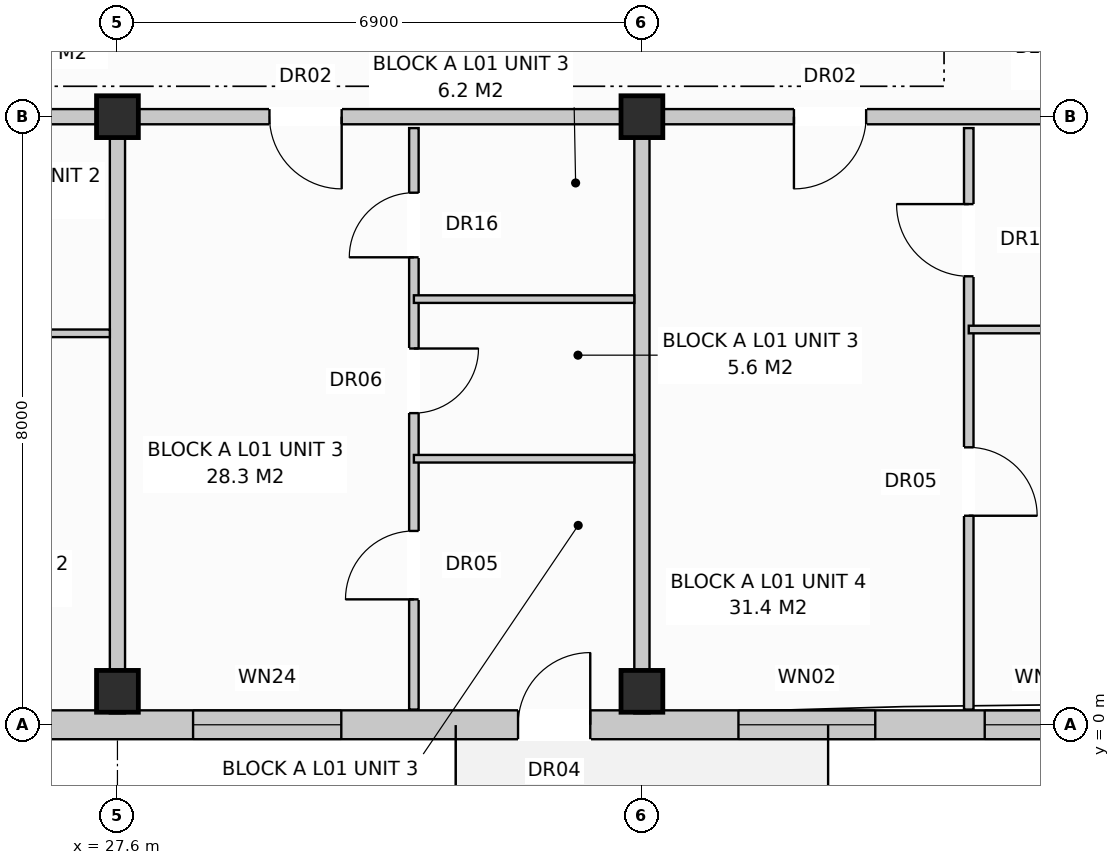
"""IFC4 building model, lengths in metres.
Left out: names, types, materials, properties, quantities, classifications, styles, units other than length and angle.
Written with IfcOpenShell. Run it as: python <this file> out.ifc"""

import sys

from ifc_helpers import new_model, si_unit, direction, frame, frame_2d, origin, origin_with_axes, origin_2d, place, context, subcontext, project, spatial, rectangle, extrude, element, fill, save


model = new_model("IFC4")
c1 = context("Model", 3, precision=1e-05, world=origin(), true_north=direction((0.0, 1.0)))
c2 = subcontext(c1, "Body", "Model", "MODEL_VIEW")
j1 = project(units=[si_unit("LENGTHUNIT", "METRE"), si_unit("PLANEANGLEUNIT", "RADIAN")], contexts=[c1])
p1 = place(None, origin())
s1 = spatial("IfcSite", under=j1, at=p1, CompositionType="ELEMENT")
p2 = place(p1, origin())
s2 = spatial("IfcBuilding", under=s1, at=p2, CompositionType="ELEMENT")
p3 = place(p2, frame((0.0, 0.0, 4.4)))
s3 = spatial("IfcBuildingStorey", under=s2, at=p3, CompositionType="ELEMENT", Elevation=4.4)
for number, where, z_axis, x_axis in (
    (1, (27.6, 0.44, 0.0), (0.0, 0.0, 1.0), (1.0, 0.0, 0.0)),
    (2, (27.6, 8.0, 0.0), (0.0, 0.0, 1.0), (1.0, 0.0, 0.0)),
    (3, (34.5, 0.44, 0.0), (0.0, 0.0, 1.0), (1.0, 0.0, 0.0)),
    (4, (34.5, 8.0, 0.0), (0.0, 0.0, 1.0), (1.0, 0.0, 0.0)),
):
    element("IfcColumn", number, at=place(p3, frame(where, z_axis=z_axis, x_axis=x_axis)), inside=s3, PredefinedType="COLUMN", context=c2, shape_type="SweptSolid", body=[
        extrude(rectangle(XDim=0.55, YDim=0.55, at=origin_2d()), origin(), (0.0, 0.0, 1.0), 3.6),
    ])
p4 = place(p3, frame((0.18, 0.0, 0.0), z_axis=(0.0, 0.0, 1.0), x_axis=(1.0, 0.0, 0.0)))
e5 = element("IfcWall", 5, at=p4, inside=s3, PredefinedType="STANDARD", context=c2, shape_type="SweptSolid", body=[
    extrude(rectangle(XDim=54.84, YDim=0.38, at=frame_2d((27.42, 0.0))), origin(), (0.0, 0.0, 1.0), 3.33),
])
p5 = place(p4, frame((5.09, 0.0, 0.0)))
e6 = element("IfcOpeningElement", 6, at=p5, cuts=e5, PredefinedType="OPENING", context=c2, shape_type="SweptSolid", body=[
    extrude(rectangle(XDim=0.95, YDim=2.1, at=frame_2d((0.475, 1.05))), frame((0.0, 0.202, 0.0), z_axis=(0.0, -1.0, 0.0), x_axis=(1.0, 0.0, 0.0)), (0.0, 0.0, 1.0), 0.404),
])
p6 = place(p4, frame((18.89, 0.0, 0.0)))
e7 = element("IfcOpeningElement", 7, at=p6, cuts=e5, PredefinedType="OPENING", context=c2, shape_type="SweptSolid", body=[
    extrude(rectangle(XDim=0.95, YDim=2.1, at=frame_2d((0.475, 1.05))), frame((0.0, 0.202, 0.0), z_axis=(0.0, -1.0, 0.0), x_axis=(1.0, 0.0, 0.0)), (0.0, 0.0, 1.0), 0.404),
])
p7 = place(p4, frame((32.69, 0.0, 0.0)))
e8 = element("IfcOpeningElement", 8, at=p7, cuts=e5, PredefinedType="OPENING", context=c2, shape_type="SweptSolid", body=[
    extrude(rectangle(XDim=0.95, YDim=2.1, at=frame_2d((0.475, 1.05))), frame((0.0, 0.202, 0.0), z_axis=(0.0, -1.0, 0.0), x_axis=(1.0, 0.0, 0.0)), (0.0, 0.0, 1.0), 0.404),
])
p8 = place(p4, frame((46.507, 0.0, 0.0)))
e9 = element("IfcOpeningElement", 9, at=p8, cuts=e5, PredefinedType="OPENING", context=c2, shape_type="SweptSolid", body=[
    extrude(rectangle(XDim=0.95, YDim=2.1, at=frame_2d((0.475, 1.05))), frame((0.0, 0.202, 0.0), z_axis=(0.0, -1.0, 0.0), x_axis=(1.0, 0.0, 0.0)), (0.0, 0.0, 1.0), 0.404),
])
p9 = place(p4, frame((0.89, 0.0, 0.8)))
e10 = element("IfcOpeningElement", 10, at=p9, cuts=e5, PredefinedType="OPENING", context=c2, shape_type="SweptSolid", body=[
    extrude(rectangle(XDim=1.8, YDim=1.7, at=frame_2d((0.9, 0.85))), frame((0.0, 0.202, 0.0), z_axis=(0.0, -1.0, 0.0), x_axis=(1.0, 0.0, 0.0)), (0.0, 0.0, 1.0), 0.404),
])
p10 = place(p4, frame((8.94, 0.0, 0.8)))
e11 = element("IfcOpeningElement", 11, at=p10, cuts=e5, PredefinedType="OPENING", context=c2, shape_type="SweptSolid", body=[
    extrude(rectangle(XDim=1.9, YDim=1.85, at=frame_2d((0.95, 0.925))), frame((0.0, 0.202, 0.0), z_axis=(0.0, -1.0, 0.0), x_axis=(1.0, 0.0, 0.0)), (0.0, 0.0, 1.0), 0.404),
])
p11 = place(p4, frame((14.615, 0.0, 0.8)))
e12 = element("IfcOpeningElement", 12, at=p11, cuts=e5, PredefinedType="OPENING", context=c2, shape_type="SweptSolid", body=[
    extrude(rectangle(XDim=1.95, YDim=1.65, at=frame_2d((0.975, 0.825))), frame((0.0, 0.202, 0.0), z_axis=(0.0, -1.0, 0.0), x_axis=(1.0, 0.0, 0.0)), (0.0, 0.0, 1.0), 0.404),
])
p12 = place(p4, frame((21.09, 0.0, 0.8)))
e13 = element("IfcOpeningElement", 13, at=p12, cuts=e5, PredefinedType="OPENING", context=c2, shape_type="SweptSolid", body=[
    extrude(rectangle(XDim=1.8, YDim=1.7, at=frame_2d((0.9, 0.85))), frame((0.0, 0.202, 0.0), z_axis=(0.0, -1.0, 0.0), x_axis=(1.0, 0.0, 0.0)), (0.0, 0.0, 1.0), 0.404),
])
p13 = place(p4, frame((24.44, 0.0, 0.8)))
e14 = element("IfcOpeningElement", 14, at=p13, cuts=e5, PredefinedType="OPENING", context=c2, shape_type="SweptSolid", body=[
    extrude(rectangle(XDim=1.9, YDim=1.85, at=frame_2d((0.95, 0.925))), frame((0.0, 0.202, 0.0), z_axis=(0.0, -1.0, 0.0), x_axis=(1.0, 0.0, 0.0)), (0.0, 0.0, 1.0), 0.404),
])
p14 = place(p4, frame((28.415, 0.0, 0.8)))
e15 = element("IfcOpeningElement", 15, at=p14, cuts=e5, PredefinedType="OPENING", context=c2, shape_type="SweptSolid", body=[
    extrude(rectangle(XDim=1.95, YDim=1.65, at=frame_2d((0.975, 0.825))), frame((0.0, 0.202, 0.0), z_axis=(0.0, -1.0, 0.0), x_axis=(1.0, 0.0, 0.0)), (0.0, 0.0, 1.0), 0.404),
])
p15 = place(p4, frame((35.59, 0.0, 0.8)))
e16 = element("IfcOpeningElement", 16, at=p15, cuts=e5, PredefinedType="OPENING", context=c2, shape_type="SweptSolid", body=[
    extrude(rectangle(XDim=1.8, YDim=1.7, at=frame_2d((0.9, 0.85))), frame((0.0, 0.202, 0.0), z_axis=(0.0, -1.0, 0.0), x_axis=(1.0, 0.0, 0.0)), (0.0, 0.0, 1.0), 0.404),
])
p16 = place(p4, frame((38.83, 0.0, 0.8)))
e17 = element("IfcOpeningElement", 17, at=p16, cuts=e5, PredefinedType="OPENING", context=c2, shape_type="SweptSolid", body=[
    extrude(rectangle(XDim=1.55, YDim=1.55, at=frame_2d((0.775, 0.775))), frame((0.0, 0.202, 0.0), z_axis=(0.0, -1.0, 0.0), x_axis=(1.0, 0.0, 0.0)), (0.0, 0.0, 1.0), 0.404),
])
p17 = place(p4, frame((42.415, 0.0, 0.8)))
e18 = element("IfcOpeningElement", 18, at=p17, cuts=e5, PredefinedType="OPENING", context=c2, shape_type="SweptSolid", body=[
    extrude(rectangle(XDim=1.95, YDim=1.65, at=frame_2d((0.975, 0.825))), frame((0.0, 0.202, 0.0), z_axis=(0.0, -1.0, 0.0), x_axis=(1.0, 0.0, 0.0)), (0.0, 0.0, 1.0), 0.404),
])
p18 = place(p4, frame((48.69, 0.0, 0.9)))
e19 = element("IfcOpeningElement", 19, at=p18, cuts=e5, PredefinedType="OPENING", context=c2, shape_type="SweptSolid", body=[
    extrude(rectangle(XDim=0.95, YDim=1.55, at=frame_2d((0.475, 0.775))), frame((0.0, 0.202, 0.0), z_axis=(0.0, -1.0, 0.0), x_axis=(1.0, 0.0, 0.0)), (0.0, 0.0, 1.0), 0.404),
])
p19 = place(p4, frame((51.44, 0.0, 0.8)))
e20 = element("IfcOpeningElement", 20, at=p19, cuts=e5, PredefinedType="OPENING", context=c2, shape_type="SweptSolid", body=[
    extrude(rectangle(XDim=1.9, YDim=1.85, at=frame_2d((0.95, 0.925))), frame((0.0, 0.202, 0.0), z_axis=(0.0, -1.0, 0.0), x_axis=(1.0, 0.0, 0.0)), (0.0, 0.0, 1.0), 0.404),
])
p20 = place(p3, frame((27.6, 7.85, 0.0), z_axis=(0.0, 0.0, 1.0), x_axis=(0.0, -1.0, 0.0)))
e21 = element("IfcWall", 21, at=p20, inside=s3, PredefinedType="PARTITIONING", context=c2, shape_type="SweptSolid", body=[
    extrude(rectangle(XDim=7.7, YDim=0.2, at=frame_2d((3.85, 0.0))), origin(), (0.0, 0.0, 1.0), 3.33),
])
p21 = place(p3, frame((6.9, 8.0, 0.0), z_axis=(0.0, 0.0, 1.0), x_axis=(1.0, 0.0, 0.0)))
e22 = element("IfcWall", 22, at=p21, inside=s3, PredefinedType="PARTITIONING", context=c2, shape_type="SweptSolid", body=[
    extrude(rectangle(XDim=20.7, YDim=0.2, at=frame_2d((10.35, 0.0))), origin(), (0.0, 0.0, 1.0), 2.77),
])
p22 = place(p21, frame((2.4, 0.0, 0.0)))
e23 = element("IfcOpeningElement", 23, at=p22, cuts=e22, PredefinedType="OPENING", context=c2, shape_type="SweptSolid", body=[
    extrude(rectangle(XDim=0.95, YDim=2.15, at=frame_2d((0.475, 1.075))), frame((0.0, 0.112, 0.0), z_axis=(0.0, -1.0, 0.0), x_axis=(1.0, 0.0, 0.0)), (0.0, 0.0, 1.0), 0.224),
])
p23 = place(p3, frame((13.2, 5.15, 0.0), z_axis=(0.0, 0.0, 1.0), x_axis=(1.0, 0.0, 0.0)))
e24 = element("IfcWall", 24, at=p23, inside=s3, PredefinedType="PARTITIONING", context=c2, shape_type="SweptSolid", body=[
    extrude(rectangle(XDim=14.3, YDim=0.1, at=frame_2d((7.15, 0.0))), origin(), (0.0, 0.0, 1.0), 3.33),
])
p24 = place(p23, frame((1.6, 0.0, 0.0)))
e25 = element("IfcOpeningElement", 25, at=p24, cuts=e24, PredefinedType="OPENING", context=c2, shape_type="SweptSolid", body=[
    extrude(rectangle(XDim=0.9, YDim=2.1, at=frame_2d((0.45, 1.05))), frame((0.0, 0.062, 0.0), z_axis=(0.0, -1.0, 0.0), x_axis=(1.0, 0.0, 0.0)), (0.0, 0.0, 1.0), 0.124),
])
p25 = place(p23, frame((5.1, 0.0, 0.0)))
e26 = element("IfcOpeningElement", 26, at=p25, cuts=e24, PredefinedType="OPENING", context=c2, shape_type="SweptSolid", body=[
    extrude(rectangle(XDim=0.85, YDim=2.05, at=frame_2d((0.425, 1.025))), frame((0.0, 0.062, 0.0), z_axis=(0.0, -1.0, 0.0), x_axis=(1.0, 0.0, 0.0)), (0.0, 0.0, 1.0), 0.124),
])
p26 = place(p23, frame((8.2, 0.0, 0.0)))
e27 = element("IfcOpeningElement", 27, at=p26, cuts=e24, PredefinedType="OPENING", context=c2, shape_type="SweptSolid", body=[
    extrude(rectangle(XDim=0.85, YDim=2.05, at=frame_2d((0.425, 1.025))), frame((0.0, 0.062, 0.0), z_axis=(0.0, -1.0, 0.0), x_axis=(1.0, 0.0, 0.0)), (0.0, 0.0, 1.0), 0.124),
])
p27 = place(p23, frame((11.6, 0.0, 0.0)))
e28 = element("IfcOpeningElement", 28, at=p27, cuts=e24, PredefinedType="OPENING", context=c2, shape_type="SweptSolid", body=[
    extrude(rectangle(XDim=0.85, YDim=2.05, at=frame_2d((0.425, 1.025))), frame((0.0, 0.062, 0.0), z_axis=(0.0, -1.0, 0.0), x_axis=(1.0, 0.0, 0.0)), (0.0, 0.0, 1.0), 0.124),
])
p28 = place(p3, frame((34.5, 7.85, 0.0), z_axis=(0.0, 0.0, 1.0), x_axis=(0.0, -1.0, 0.0)))
e29 = element("IfcWall", 29, at=p28, inside=s3, PredefinedType="PARTITIONING", context=c2, shape_type="SweptSolid", body=[
    extrude(rectangle(XDim=7.7, YDim=0.2, at=frame_2d((3.85, 0.0))), origin(), (0.0, 0.0, 1.0), 3.33),
])
p29 = place(p3, frame((27.6, 8.0, 0.0), z_axis=(0.0, 0.0, 1.0), x_axis=(1.0, 0.0, 0.0)))
e30 = element("IfcWall", 30, at=p29, inside=s3, PredefinedType="PARTITIONING", context=c2, shape_type="SweptSolid", body=[
    extrude(rectangle(XDim=6.9, YDim=0.2, at=frame_2d((3.45, 0.0))), origin(), (0.0, 0.0, 1.0), 2.77),
])
p30 = place(p29, frame((2.0, 0.0, 0.0)))
e31 = element("IfcOpeningElement", 31, at=p30, cuts=e30, PredefinedType="OPENING", context=c2, shape_type="SweptSolid", body=[
    extrude(rectangle(XDim=0.95, YDim=2.15, at=frame_2d((0.475, 1.075))), frame((0.0, 0.112, 0.0), z_axis=(0.0, -1.0, 0.0), x_axis=(1.0, 0.0, 0.0)), (0.0, 0.0, 1.0), 0.224),
])
p31 = place(p3, frame((31.5, 7.85, 0.0), z_axis=(0.0, 0.0, 1.0), x_axis=(0.0, -1.0, 0.0)))
e32 = element("IfcWall", 32, at=p31, inside=s3, PredefinedType="PARTITIONING", context=c2, shape_type="SweptSolid", body=[
    extrude(rectangle(XDim=7.65, YDim=0.125, at=frame_2d((3.825, 0.0))), origin(), (0.0, 0.0, 1.0), 3.33),
])
p32 = place(p31, frame((0.85, 0.0, 0.0)))
e33 = element("IfcOpeningElement", 33, at=p32, cuts=e32, PredefinedType="OPENING", context=c2, shape_type="SweptSolid", body=[
    extrude(rectangle(XDim=0.85, YDim=2.1, at=frame_2d((0.425, 1.05))), frame((0.0, 0.074, 0.0), z_axis=(0.0, -1.0, 0.0), x_axis=(1.0, 0.0, 0.0)), (0.0, 0.0, 1.0), 0.149),
])
p33 = place(p31, frame((2.9, 0.0, 0.0)))
e34 = element("IfcOpeningElement", 34, at=p33, cuts=e32, PredefinedType="OPENING", context=c2, shape_type="SweptSolid", body=[
    extrude(rectangle(XDim=0.85, YDim=2.05, at=frame_2d((0.425, 1.025))), frame((0.0, 0.074, 0.0), z_axis=(0.0, -1.0, 0.0), x_axis=(1.0, 0.0, 0.0)), (0.0, 0.0, 1.0), 0.149),
])
p34 = place(p31, frame((5.3, 0.0, 0.0)))
e35 = element("IfcOpeningElement", 35, at=p34, cuts=e32, PredefinedType="OPENING", context=c2, shape_type="SweptSolid", body=[
    extrude(rectangle(XDim=0.9, YDim=2.1, at=frame_2d((0.45, 1.05))), frame((0.0, 0.074, 0.0), z_axis=(0.0, -1.0, 0.0), x_axis=(1.0, 0.0, 0.0)), (0.0, 0.0, 1.0), 0.149),
])
for number, where, z_axis, x_axis in (
    (36, (31.5, 5.6, 0.0), (0.0, 0.0, 1.0), (1.0, 0.0, 0.0)),
    (37, (31.5, 3.5, 0.0), (0.0, 0.0, 1.0), (1.0, 0.0, 0.0)),
):
    element("IfcWall", number, at=place(p3, frame(where, z_axis=z_axis, x_axis=x_axis)), inside=s3, PredefinedType="PARTITIONING", context=c2, shape_type="SweptSolid", body=[
        extrude(rectangle(XDim=2.9, YDim=0.1, at=frame_2d((1.45, 0.0))), origin(), (0.0, 0.0, 1.0), 3.33),
    ])
p35 = place(p3, frame((34.5, 8.0, 0.0), z_axis=(0.0, 0.0, 1.0), x_axis=(1.0, 0.0, 0.0)))
e38 = element("IfcWall", 38, at=p35, inside=s3, PredefinedType="PARTITIONING", context=c2, shape_type="SweptSolid", body=[
    extrude(rectangle(XDim=6.9, YDim=0.2, at=frame_2d((3.45, 0.0))), origin(), (0.0, 0.0, 1.0), 2.77),
])
p36 = place(p35, frame((2.0, 0.0, 0.0)))
e39 = element("IfcOpeningElement", 39, at=p36, cuts=e38, PredefinedType="OPENING", context=c2, shape_type="SweptSolid", body=[
    extrude(rectangle(XDim=0.95, YDim=2.15, at=frame_2d((0.475, 1.075))), frame((0.0, 0.112, 0.0), z_axis=(0.0, -1.0, 0.0), x_axis=(1.0, 0.0, 0.0)), (0.0, 0.0, 1.0), 0.224),
])
p37 = place(p3, frame((38.8, 7.85, 0.0), z_axis=(0.0, 0.0, 1.0), x_axis=(0.0, -1.0, 0.0)))
e40 = element("IfcWall", 40, at=p37, inside=s3, PredefinedType="PARTITIONING", context=c2, shape_type="SweptSolid", body=[
    extrude(rectangle(XDim=7.65, YDim=0.125, at=frame_2d((3.825, 0.0))), origin(), (0.0, 0.0, 1.0), 3.33),
])
p38 = place(p37, frame((1.0, 0.0, 0.0)))
e41 = element("IfcOpeningElement", 41, at=p38, cuts=e40, PredefinedType="OPENING", context=c2, shape_type="SweptSolid", body=[
    extrude(rectangle(XDim=0.95, YDim=2.1, at=frame_2d((0.475, 1.05))), frame((0.0, 0.074, 0.0), z_axis=(0.0, -1.0, 0.0), x_axis=(1.0, 0.0, 0.0)), (0.0, 0.0, 1.0), 0.149),
])
p39 = place(p37, frame((4.2, 0.0, 0.0)))
e42 = element("IfcOpeningElement", 42, at=p39, cuts=e40, PredefinedType="OPENING", context=c2, shape_type="SweptSolid", body=[
    extrude(rectangle(XDim=0.9, YDim=2.1, at=frame_2d((0.45, 1.05))), frame((0.0, 0.074, 0.0), z_axis=(0.0, -1.0, 0.0), x_axis=(1.0, 0.0, 0.0)), (0.0, 0.0, 1.0), 0.149),
])
p40 = place(p3, frame((38.8, 5.2, 0.0), z_axis=(0.0, 0.0, 1.0), x_axis=(1.0, 0.0, 0.0)))
e43 = element("IfcWall", 43, at=p40, inside=s3, PredefinedType="PARTITIONING", context=c2, shape_type="SweptSolid", body=[
    extrude(rectangle(XDim=2.5, YDim=0.1, at=frame_2d((1.25, 0.0))), origin(), (0.0, 0.0, 1.0), 3.33),
])
p41 = place(p7, origin_with_axes())
e44 = element("IfcDoor", 44, at=p41, inside=s3, OperationType="SINGLE_SWING_RIGHT", PredefinedType="DOOR", context=c2, shape_type="SweptSolid", body=[
    extrude(rectangle(XDim=0.95, YDim=2.1, at=frame_2d((0.475, 1.05))), frame((0.0, 0.025, 0.0), z_axis=(0.0, -1.0, 0.0), x_axis=(1.0, 0.0, 0.0)), (0.0, 0.0, 1.0), 0.05),
])
fill(e8, e44)
p42 = place(p14, origin_with_axes())
e45 = element("IfcWindow", 45, at=p42, inside=s3, PartitioningType="SINGLE_PANEL", PredefinedType="WINDOW", context=c2, shape_type="SweptSolid", body=[
    extrude(rectangle(XDim=1.95, YDim=1.65, at=frame_2d((0.975, 0.825))), frame((0.0, 0.03, 0.0), z_axis=(0.0, -1.0, 0.0), x_axis=(1.0, 0.0, 0.0)), (0.0, 0.0, 1.0), 0.06),
])
fill(e15, e45)
p43 = place(p15, origin_with_axes())
e46 = element("IfcWindow", 46, at=p43, inside=s3, PartitioningType="SINGLE_PANEL", PredefinedType="WINDOW", context=c2, shape_type="SweptSolid", body=[
    extrude(rectangle(XDim=1.8, YDim=1.7, at=frame_2d((0.9, 0.85))), frame((0.0, 0.03, 0.0), z_axis=(0.0, -1.0, 0.0), x_axis=(1.0, 0.0, 0.0)), (0.0, 0.0, 1.0), 0.06),
])
fill(e16, e46)
p44 = place(p16, origin_with_axes())
e47 = element("IfcWindow", 47, at=p44, inside=s3, PartitioningType="SINGLE_PANEL", PredefinedType="WINDOW", context=c2, shape_type="SweptSolid", body=[
    extrude(rectangle(XDim=1.55, YDim=1.55, at=frame_2d((0.775, 0.775))), frame((0.0, 0.03, 0.0), z_axis=(0.0, -1.0, 0.0), x_axis=(1.0, 0.0, 0.0)), (0.0, 0.0, 1.0), 0.06),
])
fill(e17, e47)
p45 = place(p30, frame((0.95, 0.0, 0.0), z_axis=(0.0, 0.0, 1.0), x_axis=(-1.0, 0.0, 0.0)))
e48 = element("IfcDoor", 48, at=p45, inside=s3, OperationType="SINGLE_SWING_RIGHT", PredefinedType="DOOR", context=c2, shape_type="SweptSolid", body=[
    extrude(rectangle(XDim=0.95, YDim=2.15, at=frame_2d((0.475, 1.075))), frame((0.0, 0.025, 0.0), z_axis=(0.0, -1.0, 0.0), x_axis=(1.0, 0.0, 0.0)), (0.0, 0.0, 1.0), 0.05),
])
fill(e31, e48)
p46 = place(p32, frame((0.85, 0.0, 0.0), z_axis=(0.0, 0.0, 1.0), x_axis=(-1.0, 0.0, 0.0)))
e49 = element("IfcDoor", 49, at=p46, inside=s3, OperationType="SINGLE_SWING_RIGHT", PredefinedType="DOOR", context=c2, shape_type="SweptSolid", body=[
    extrude(rectangle(XDim=0.85, YDim=2.1, at=frame_2d((0.425, 1.05))), frame((0.0, 0.025, 0.0), z_axis=(0.0, -1.0, 0.0), x_axis=(1.0, 0.0, 0.0)), (0.0, 0.0, 1.0), 0.05),
])
fill(e33, e49)
p47 = place(p33, origin_with_axes())
e50 = element("IfcDoor", 50, at=p47, inside=s3, OperationType="SINGLE_SWING_LEFT", PredefinedType="DOOR", context=c2, shape_type="SweptSolid", body=[
    extrude(rectangle(XDim=0.85, YDim=2.05, at=frame_2d((0.425, 1.025))), frame((0.0, 0.025, 0.0), z_axis=(0.0, -1.0, 0.0), x_axis=(1.0, 0.0, 0.0)), (0.0, 0.0, 1.0), 0.05),
])
fill(e34, e50)
p48 = place(p34, frame((0.9, 0.0, 0.0), z_axis=(0.0, 0.0, 1.0), x_axis=(-1.0, 0.0, 0.0)))
e51 = element("IfcDoor", 51, at=p48, inside=s3, OperationType="SINGLE_SWING_RIGHT", PredefinedType="DOOR", context=c2, shape_type="SweptSolid", body=[
    extrude(rectangle(XDim=0.9, YDim=2.1, at=frame_2d((0.45, 1.05))), frame((0.0, 0.025, 0.0), z_axis=(0.0, -1.0, 0.0), x_axis=(1.0, 0.0, 0.0)), (0.0, 0.0, 1.0), 0.05),
])
fill(e35, e51)
p49 = place(p36, frame((0.95, 0.0, 0.0), z_axis=(0.0, 0.0, 1.0), x_axis=(-1.0, 0.0, 0.0)))
e52 = element("IfcDoor", 52, at=p49, inside=s3, OperationType="SINGLE_SWING_LEFT", PredefinedType="DOOR", context=c2, shape_type="SweptSolid", body=[
    extrude(rectangle(XDim=0.95, YDim=2.15, at=frame_2d((0.475, 1.075))), frame((0.0, 0.025, 0.0), z_axis=(0.0, -1.0, 0.0), x_axis=(1.0, 0.0, 0.0)), (0.0, 0.0, 1.0), 0.05),
])
fill(e39, e52)
p50 = place(p38, frame((0.95, 0.0, 0.0), z_axis=(0.0, 0.0, 1.0), x_axis=(-1.0, 0.0, 0.0)))
e53 = element("IfcDoor", 53, at=p50, inside=s3, OperationType="SINGLE_SWING_LEFT", PredefinedType="DOOR", context=c2, shape_type="SweptSolid", body=[
    extrude(rectangle(XDim=0.95, YDim=2.1, at=frame_2d((0.475, 1.05))), frame((0.0, 0.025, 0.0), z_axis=(0.0, -1.0, 0.0), x_axis=(1.0, 0.0, 0.0)), (0.0, 0.0, 1.0), 0.05),
])
fill(e41, e53)
p51 = place(p39, origin_with_axes())
e54 = element("IfcDoor", 54, at=p51, inside=s3, OperationType="SINGLE_SWING_RIGHT", PredefinedType="DOOR", context=c2, shape_type="SweptSolid", body=[
    extrude(rectangle(XDim=0.9, YDim=2.1, at=frame_2d((0.45, 1.05))), frame((0.0, 0.025, 0.0), z_axis=(0.0, -1.0, 0.0), x_axis=(1.0, 0.0, 0.0)), (0.0, 0.0, 1.0), 0.05),
])
fill(e42, e54)
save(model, sys.argv[1])
